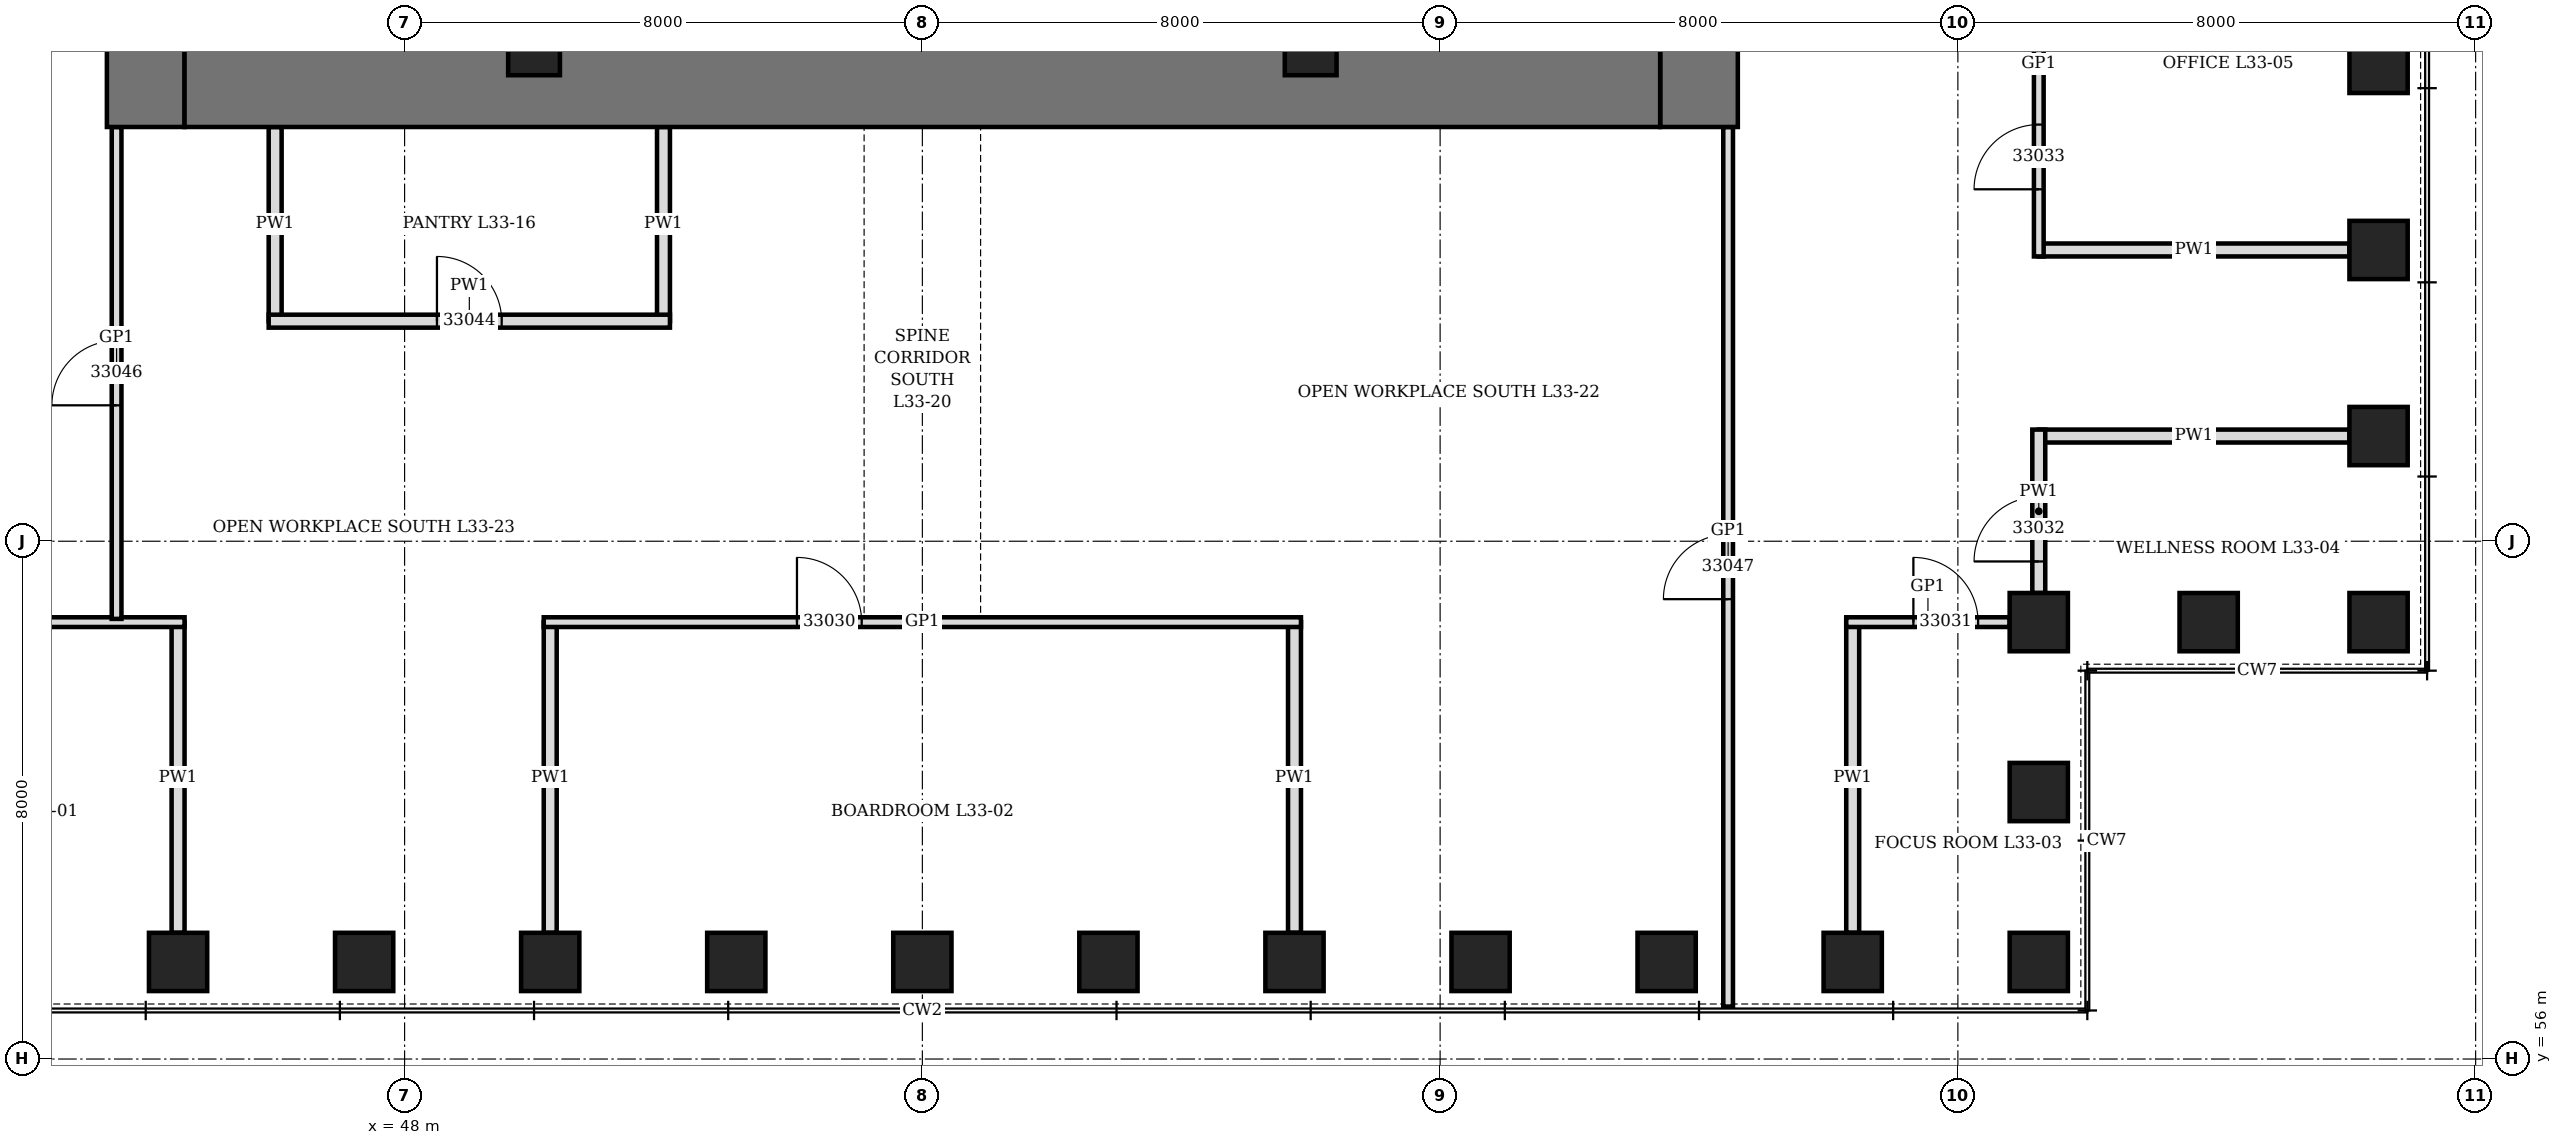
"""IFC4 building model, lengths in metres.
Left out: names, types, materials, properties, quantities, classifications, styles, units other than length and angle.
Written with IfcOpenShell. Run it as: python <this file> out.ifc"""

import sys

from ifc_helpers import new_model, si_unit, direction, frame, frame_2d, origin, origin_2d, place, context, subcontext, project, spatial, rectangle, hollow_rectangle, extrude, element, fill, save


model = new_model("IFC4")
c1 = context("Model", 3, precision=1e-05, world=origin(), true_north=direction((0.0, 1.0)))
c2 = subcontext(c1, "Body", "Model", "MODEL_VIEW")
j1 = project(units=[si_unit("LENGTHUNIT", "METRE"), si_unit("PLANEANGLEUNIT", "RADIAN")], contexts=[c1])
p1 = place(None, origin())
s1 = spatial("IfcSite", under=j1, at=p1, CompositionType="ELEMENT")
p2 = place(p1, origin())
s2 = spatial("IfcBuilding", under=s1, at=p2, CompositionType="ELEMENT")
p3 = place(p2, frame((0.0, 0.0, 150.1)))
s3 = spatial("IfcBuildingStorey", under=s2, at=p3, CompositionType="ELEMENT", Elevation=150.1)
for number, where, z_axis, x_axis in (
    (1, (44.5, 57.5, 0.0), (0.0, 0.0, 1.0), (1.0, 0.0, 0.0)),
    (2, (47.375, 57.5, 0.0), (0.0, 0.0, 1.0), (1.0, 0.0, 0.0)),
    (3, (50.25, 57.5, 0.0), (0.0, 0.0, 1.0), (1.0, 0.0, 0.0)),
    (4, (53.125, 57.5, 0.0), (0.0, 0.0, 1.0), (1.0, 0.0, 0.0)),
    (5, (56.0, 57.5, 0.0), (0.0, 0.0, 1.0), (1.0, 0.0, 0.0)),
    (6, (58.875, 57.5, 0.0), (0.0, 0.0, 1.0), (1.0, 0.0, 0.0)),
    (7, (61.75, 57.5, 0.0), (0.0, 0.0, 1.0), (1.0, 0.0, 0.0)),
    (8, (64.625, 57.5, 0.0), (0.0, 0.0, 1.0), (1.0, 0.0, 0.0)),
    (9, (67.5, 57.5, 0.0), (0.0, 0.0, 1.0), (1.0, 0.0, 0.0)),
    (10, (70.375, 57.5, 0.0), (0.0, 0.0, 1.0), (1.0, 0.0, 0.0)),
    (11, (73.25, 57.5, 0.0), (0.0, 0.0, 1.0), (0.0, 1.0, 0.0)),
    (12, (73.25, 60.125, 0.0), (0.0, 0.0, 1.0), (0.0, 1.0, 0.0)),
    (13, (73.25, 62.75, 0.0), (0.0, 0.0, 1.0), (1.0, 0.0, 0.0)),
    (14, (75.875, 62.75, 0.0), (0.0, 0.0, 1.0), (1.0, 0.0, 0.0)),
    (15, (78.5, 62.75, 0.0), (0.0, 0.0, 1.0), (0.0, 1.0, 0.0)),
    (16, (78.5, 65.625, 0.0), (0.0, 0.0, 1.0), (0.0, 1.0, 0.0)),
    (17, (78.5, 68.5, 0.0), (0.0, 0.0, 1.0), (0.0, 1.0, 0.0)),
    (18, (78.5, 71.375, 0.0), (0.0, 0.0, 1.0), (0.0, 1.0, 0.0)),
):
    element("IfcColumn", number, at=place(p3, frame(where, z_axis=z_axis, x_axis=x_axis)), inside=s3, PredefinedType="COLUMN", context=c2, shape_type="SweptSolid", body=[
        extrude(hollow_rectangle(XDim=0.9, YDim=0.9, WallThickness=0.12, at=origin_2d()), origin(), (0.0, 0.0, 1.0), 4.2),
    ])
p4 = place(p3, frame((44.0, 70.4, 0.0), z_axis=(0.0, 0.0, 1.0), x_axis=(0.0, 1.0, 0.0)))
e19 = element("IfcWall", 19, at=p4, inside=s3, PredefinedType="SHEAR", context=c2, shape_type="SweptSolid", body=[
    extrude(rectangle(XDim=19.2, YDim=1.2, at=frame_2d((9.6, 0.0))), origin(), (0.0, 0.0, 1.0), 4.2),
])
p5 = place(p4, frame((8.6, 0.0, 0.0)))
e20 = element("IfcOpeningElement", 20, at=p5, cuts=e19, PredefinedType="OPENING", context=c2, shape_type="SweptSolid", body=[
    extrude(rectangle(XDim=2.0, YDim=2.4, at=frame_2d((1.0, 1.2))), frame((0.0, 0.61, 0.0), z_axis=(0.0, -1.0, 0.0), x_axis=(1.0, 0.0, 0.0)), (0.0, 0.0, 1.0), 1.22),
])
p6 = place(p3, frame((68.0, 70.4, 0.0), z_axis=(0.0, 0.0, 1.0), x_axis=(0.0, 1.0, 0.0)))
e21 = element("IfcWall", 21, at=p6, inside=s3, PredefinedType="SHEAR", context=c2, shape_type="SweptSolid", body=[
    extrude(rectangle(XDim=19.2, YDim=1.2, at=frame_2d((9.6, 0.0))), origin(), (0.0, 0.0, 1.0), 4.2),
])
p7 = place(p6, frame((8.6, 0.0, 0.0)))
e22 = element("IfcOpeningElement", 22, at=p7, cuts=e21, PredefinedType="OPENING", context=c2, shape_type="SweptSolid", body=[
    extrude(rectangle(XDim=2.0, YDim=2.4, at=frame_2d((1.0, 1.2))), frame((0.0, 0.61, 0.0), z_axis=(0.0, -1.0, 0.0), x_axis=(1.0, 0.0, 0.0)), (0.0, 0.0, 1.0), 1.22),
])
p8 = place(p3, frame((44.6, 71.0, 0.0), z_axis=(0.0, 0.0, 1.0), x_axis=(1.0, 0.0, 0.0)))
e23 = element("IfcWall", 23, at=p8, inside=s3, PredefinedType="SHEAR", context=c2, shape_type="SweptSolid", body=[
    extrude(rectangle(XDim=22.8, YDim=1.2, at=frame_2d((11.4, 0.0))), origin(), (0.0, 0.0, 1.0), 4.2),
])
for number, where, z_axis, x_axis in (
    (24, (50.0, 71.6, 0.0), (0.0, 0.0, 1.0), (1.0, 0.0, 0.0)),
    (25, (62.0, 71.6, 0.0), (0.0, 0.0, 1.0), (1.0, 0.0, 0.0)),
):
    element("IfcColumn", number, at=place(p3, frame(where, z_axis=z_axis, x_axis=x_axis)), inside=s3, PredefinedType="COLUMN", context=c2, shape_type="SweptSolid", body=[
        extrude(hollow_rectangle(XDim=0.8, YDim=0.8, WallThickness=0.1, at=origin_2d()), origin(), (0.0, 0.0, 1.0), 4.2),
    ])
p9 = place(p3, frame((44.5, 57.95, 0.0), z_axis=(0.0, 0.0, 1.0), x_axis=(0.0, 1.0, 0.0)))
e26 = element("IfcWall", 26, at=p9, inside=s3, PredefinedType="PARTITIONING", context=c2, shape_type="SweptSolid", body=[
    extrude(rectangle(XDim=4.8, YDim=0.2, at=frame_2d((2.4, 0.0))), origin(), (0.0, 0.0, 1.0), 2.74),
])
for number, where, z_axis, x_axis in (
    (27, (50.25, 57.95, 0.0), (0.0, 0.0, 1.0), (0.0, 1.0, 0.0)),
    (28, (61.75, 57.95, 0.0), (0.0, 0.0, 1.0), (0.0, 1.0, 0.0)),
):
    element("IfcWall", number, at=place(p3, frame(where, z_axis=z_axis, x_axis=x_axis)), inside=s3, PredefinedType="PARTITIONING", context=c2, shape_type="SweptSolid", body=[
        extrude(rectangle(XDim=4.8, YDim=0.2, at=frame_2d((2.4, 0.0))), origin(), (0.0, 0.0, 1.0), 3.278),
    ])
for number, where, z_axis, x_axis in (
    (29, (70.375, 57.95, 0.0), (0.0, 0.0, 1.0), (0.0, 1.0, 0.0)),
    (30, (73.25, 65.625, 0.0), (0.0, 0.0, 1.0), (1.0, 0.0, 0.0)),
    (31, (73.25, 68.5, 0.0), (0.0, 0.0, 1.0), (1.0, 0.0, 0.0)),
):
    element("IfcWall", number, at=place(p3, frame(where, z_axis=z_axis, x_axis=x_axis)), inside=s3, PredefinedType="PARTITIONING", context=c2, shape_type="SweptSolid", body=[
        extrude(rectangle(XDim=4.8, YDim=0.2, at=frame_2d((2.4, 0.0))), origin(), (0.0, 0.0, 1.0), 3.428),
    ])
for number, where, z_axis, x_axis in (
    (32, (46.0, 67.4, 0.0), (0.0, 0.0, 1.0), (0.0, 1.0, 0.0)),
    (33, (52.0, 67.4, 0.0), (0.0, 0.0, 1.0), (0.0, 1.0, 0.0)),
):
    element("IfcWall", number, at=place(p3, frame(where, z_axis=z_axis, x_axis=x_axis)), inside=s3, PredefinedType="PARTITIONING", context=c2, shape_type="SweptSolid", body=[
        extrude(rectangle(XDim=3.0, YDim=0.2, at=frame_2d((1.5, 0.0))), origin(), (0.0, 0.0, 1.0), 4.04),
    ])
p10 = place(p3, frame((39.2, 62.75, 0.0), z_axis=(0.0, 0.0, 1.0), x_axis=(1.0, 0.0, 0.0)))
e34 = element("IfcWall", 34, at=p10, inside=s3, PredefinedType="PARTITIONING", context=c2, shape_type="SweptSolid", body=[
    extrude(rectangle(XDim=5.4, YDim=0.15, at=frame_2d((2.7, 0.0))), origin(), (0.0, 0.0, 1.0), 4.04),
])
p11 = place(p10, frame((0.488, 0.0, 0.0)))
e35 = element("IfcOpeningElement", 35, at=p11, cuts=e34, PredefinedType="OPENING", context=c2, shape_type="SweptSolid", body=[
    extrude(rectangle(XDim=1.0, YDim=2.4, at=frame_2d((0.5, 1.2))), frame((0.0, 0.085, 0.0), z_axis=(0.0, -1.0, 0.0), x_axis=(1.0, 0.0, 0.0)), (0.0, 0.0, 1.0), 0.17),
])
p12 = place(p3, frame((50.15, 62.75, 0.0), z_axis=(0.0, 0.0, 1.0), x_axis=(1.0, 0.0, 0.0)))
e36 = element("IfcWall", 36, at=p12, inside=s3, PredefinedType="PARTITIONING", context=c2, shape_type="SweptSolid", body=[
    extrude(rectangle(XDim=11.7, YDim=0.15, at=frame_2d((5.85, 0.0))), origin(), (0.0, 0.0, 1.0), 4.04),
])
p13 = place(p12, frame((3.913, 0.0, 0.0)))
e37 = element("IfcOpeningElement", 37, at=p13, cuts=e36, PredefinedType="OPENING", context=c2, shape_type="SweptSolid", body=[
    extrude(rectangle(XDim=1.0, YDim=2.4, at=frame_2d((0.5, 1.2))), frame((0.0, 0.085, 0.0), z_axis=(0.0, -1.0, 0.0), x_axis=(1.0, 0.0, 0.0)), (0.0, 0.0, 1.0), 0.17),
])
p14 = place(p3, frame((70.275, 62.75, 0.0), z_axis=(0.0, 0.0, 1.0), x_axis=(1.0, 0.0, 0.0)))
e38 = element("IfcWall", 38, at=p14, inside=s3, PredefinedType="PARTITIONING", context=c2, shape_type="SweptSolid", body=[
    extrude(rectangle(XDim=2.525, YDim=0.15, at=frame_2d((1.263, 0.0))), origin(), (0.0, 0.0, 1.0), 4.04),
])
p15 = place(p14, frame((1.038, 0.0, 0.0)))
e39 = element("IfcOpeningElement", 39, at=p15, cuts=e38, PredefinedType="OPENING", context=c2, shape_type="SweptSolid", body=[
    extrude(rectangle(XDim=1.0, YDim=2.4, at=frame_2d((0.5, 1.2))), frame((0.0, 0.085, 0.0), z_axis=(0.0, -1.0, 0.0), x_axis=(1.0, 0.0, 0.0)), (0.0, 0.0, 1.0), 0.17),
])
p16 = place(p3, frame((45.9, 67.4, 0.0), z_axis=(0.0, 0.0, 1.0), x_axis=(1.0, 0.0, 0.0)))
e40 = element("IfcWall", 40, at=p16, inside=s3, PredefinedType="PARTITIONING", context=c2, shape_type="SweptSolid", body=[
    extrude(rectangle(XDim=6.2, YDim=0.2, at=frame_2d((3.1, 0.0))), origin(), (0.0, 0.0, 1.0), 4.04),
])
p17 = place(p16, frame((2.6, 0.0, 0.0)))
e41 = element("IfcOpeningElement", 41, at=p17, cuts=e40, PredefinedType="OPENING", context=c2, shape_type="SweptSolid", body=[
    extrude(rectangle(XDim=1.0, YDim=2.1, at=frame_2d((0.5, 1.05))), frame((0.0, 0.11, 0.0), z_axis=(0.0, -1.0, 0.0), x_axis=(1.0, 0.0, 0.0)), (0.0, 0.0, 1.0), 0.22),
])
p18 = place(p3, frame((43.55, 62.8, 0.0), z_axis=(0.0, 0.0, 1.0), x_axis=(0.0, 1.0, 0.0)))
e42 = element("IfcWall", 42, at=p18, inside=s3, PredefinedType="PARTITIONING", context=c2, shape_type="SweptSolid", body=[
    extrude(rectangle(XDim=7.6, YDim=0.15, at=frame_2d((3.8, 0.0))), origin(), (0.0, 0.0, 1.0), 4.04),
])
p19 = place(p18, frame((3.3, 0.0, 0.0)))
e43 = element("IfcOpeningElement", 43, at=p19, cuts=e42, PredefinedType="OPENING", context=c2, shape_type="SweptSolid", body=[
    extrude(rectangle(XDim=1.0, YDim=2.4, at=frame_2d((0.5, 1.2))), frame((0.0, 0.085, 0.0), z_axis=(0.0, -1.0, 0.0), x_axis=(1.0, 0.0, 0.0)), (0.0, 0.0, 1.0), 0.17),
])
p20 = place(p3, frame((68.45, 56.81, 0.0), z_axis=(0.0, 0.0, 1.0), x_axis=(0.0, 1.0, 0.0)))
e44 = element("IfcWall", 44, at=p20, inside=s3, PredefinedType="PARTITIONING", context=c2, shape_type="SweptSolid", body=[
    extrude(rectangle(XDim=13.59, YDim=0.15, at=frame_2d((6.795, 0.0))), origin(), (0.0, 0.0, 1.0), 4.04),
])
p21 = place(p20, frame((6.295, 0.0, 0.0)))
e45 = element("IfcOpeningElement", 45, at=p21, cuts=e44, PredefinedType="OPENING", context=c2, shape_type="SweptSolid", body=[
    extrude(rectangle(XDim=1.0, YDim=2.4, at=frame_2d((0.5, 1.2))), frame((0.0, 0.085, 0.0), z_axis=(0.0, -1.0, 0.0), x_axis=(1.0, 0.0, 0.0)), (0.0, 0.0, 1.0), 0.17),
])
p22 = place(p3, frame((73.25, 68.4, 0.0), z_axis=(0.0, 0.0, 1.0), x_axis=(0.0, 1.0, 0.0)))
e46 = element("IfcWall", 46, at=p22, inside=s3, PredefinedType="PARTITIONING", context=c2, shape_type="SweptSolid", body=[
    extrude(rectangle(XDim=5.95, YDim=0.15, at=frame_2d((2.975, 0.0))), origin(), (0.0, 0.0, 1.0), 4.04),
])
p23 = place(p22, frame((1.038, 0.0, 0.0)))
e47 = element("IfcOpeningElement", 47, at=p23, cuts=e46, PredefinedType="OPENING", context=c2, shape_type="SweptSolid", body=[
    extrude(rectangle(XDim=1.0, YDim=2.1, at=frame_2d((0.5, 1.05))), frame((0.0, 0.085, 0.0), z_axis=(0.0, -1.0, 0.0), x_axis=(1.0, 0.0, 0.0)), (0.0, 0.0, 1.0), 0.17),
])
p24 = place(p3, frame((73.25, 63.2, 0.0), z_axis=(0.0, 0.0, 1.0), x_axis=(0.0, 1.0, 0.0)))
e48 = element("IfcWall", 48, at=p24, inside=s3, PredefinedType="PARTITIONING", context=c2, shape_type="SweptSolid", body=[
    extrude(rectangle(XDim=2.525, YDim=0.2, at=frame_2d((1.263, 0.0))), origin(), (0.0, 0.0, 1.0), 4.04),
])
p25 = place(p24, frame((0.488, 0.0, 0.0)))
e49 = element("IfcOpeningElement", 49, at=p25, cuts=e48, PredefinedType="OPENING", context=c2, shape_type="SweptSolid", body=[
    extrude(rectangle(XDim=1.0, YDim=2.1, at=frame_2d((0.5, 1.05))), frame((0.0, 0.11, 0.0), z_axis=(0.0, -1.0, 0.0), x_axis=(1.0, 0.0, 0.0)), (0.0, 0.0, 1.0), 0.22),
])
p26 = place(p13, origin())
e50 = element("IfcDoor", 50, at=p26, inside=s3, OperationType="SINGLE_SWING_RIGHT", PredefinedType="DOOR", context=c2, shape_type="SweptSolid", body=[
    extrude(rectangle(XDim=1.0, YDim=2.4, at=frame_2d((0.5, 1.2))), frame((0.0, 0.075, 0.0), z_axis=(0.0, -1.0, 0.0), x_axis=(1.0, 0.0, 0.0)), (0.0, 0.0, 1.0), 0.149),
])
fill(e37, e50)
p27 = place(p15, origin())
e51 = element("IfcDoor", 51, at=p27, inside=s3, OperationType="SINGLE_SWING_RIGHT", PredefinedType="DOOR", context=c2, shape_type="SweptSolid", body=[
    extrude(rectangle(XDim=1.0, YDim=2.4, at=frame_2d((0.5, 1.2))), frame((0.0, 0.075, 0.0), z_axis=(0.0, -1.0, 0.0), x_axis=(1.0, 0.0, 0.0)), (0.0, 0.0, 1.0), 0.149),
])
fill(e39, e51)
p28 = place(p25, origin())
e52 = element("IfcDoor", 52, at=p28, inside=s3, OperationType="SINGLE_SWING_LEFT", PredefinedType="DOOR", context=c2, shape_type="SweptSolid", body=[
    extrude(rectangle(XDim=1.0, YDim=2.1, at=frame_2d((0.5, 1.05))), frame((0.0, 0.1, 0.0), z_axis=(0.0, -1.0, 0.0), x_axis=(1.0, 0.0, 0.0)), (0.0, 0.0, 1.0), 0.199),
])
fill(e49, e52)
p29 = place(p23, origin())
e53 = element("IfcDoor", 53, at=p29, inside=s3, OperationType="SINGLE_SWING_LEFT", PredefinedType="DOOR", context=c2, shape_type="SweptSolid", body=[
    extrude(rectangle(XDim=1.0, YDim=2.1, at=frame_2d((0.5, 1.05))), frame((0.0, 0.075, 0.0), z_axis=(0.0, -1.0, 0.0), x_axis=(1.0, 0.0, 0.0)), (0.0, 0.0, 1.0), 0.149),
])
fill(e47, e53)
p30 = place(p17, origin())
e54 = element("IfcDoor", 54, at=p30, inside=s3, OperationType="SINGLE_SWING_LEFT", PredefinedType="DOOR", context=c2, shape_type="SweptSolid", body=[
    extrude(rectangle(XDim=1.0, YDim=2.1, at=frame_2d((0.5, 1.05))), frame((0.0, 0.1, 0.0), z_axis=(0.0, -1.0, 0.0), x_axis=(1.0, 0.0, 0.0)), (0.0, 0.0, 1.0), 0.199),
])
fill(e41, e54)
p31 = place(p19, origin())
e55 = element("IfcDoor", 55, at=p31, inside=s3, OperationType="SINGLE_SWING_RIGHT", PredefinedType="DOOR", context=c2, shape_type="SweptSolid", body=[
    extrude(rectangle(XDim=1.0, YDim=2.4, at=frame_2d((0.5, 1.2))), frame((0.0, 0.075, 0.0), z_axis=(0.0, -1.0, 0.0), x_axis=(1.0, 0.0, 0.0)), (0.0, 0.0, 1.0), 0.149),
])
fill(e43, e55)
p32 = place(p21, origin())
e56 = element("IfcDoor", 56, at=p32, inside=s3, OperationType="SINGLE_SWING_RIGHT", PredefinedType="DOOR", context=c2, shape_type="SweptSolid", body=[
    extrude(rectangle(XDim=1.0, YDim=2.4, at=frame_2d((0.5, 1.2))), frame((0.0, 0.075, 0.0), z_axis=(0.0, -1.0, 0.0), x_axis=(1.0, 0.0, 0.0)), (0.0, 0.0, 1.0), 0.149),
])
fill(e45, e56)
save(model, sys.argv[1])
